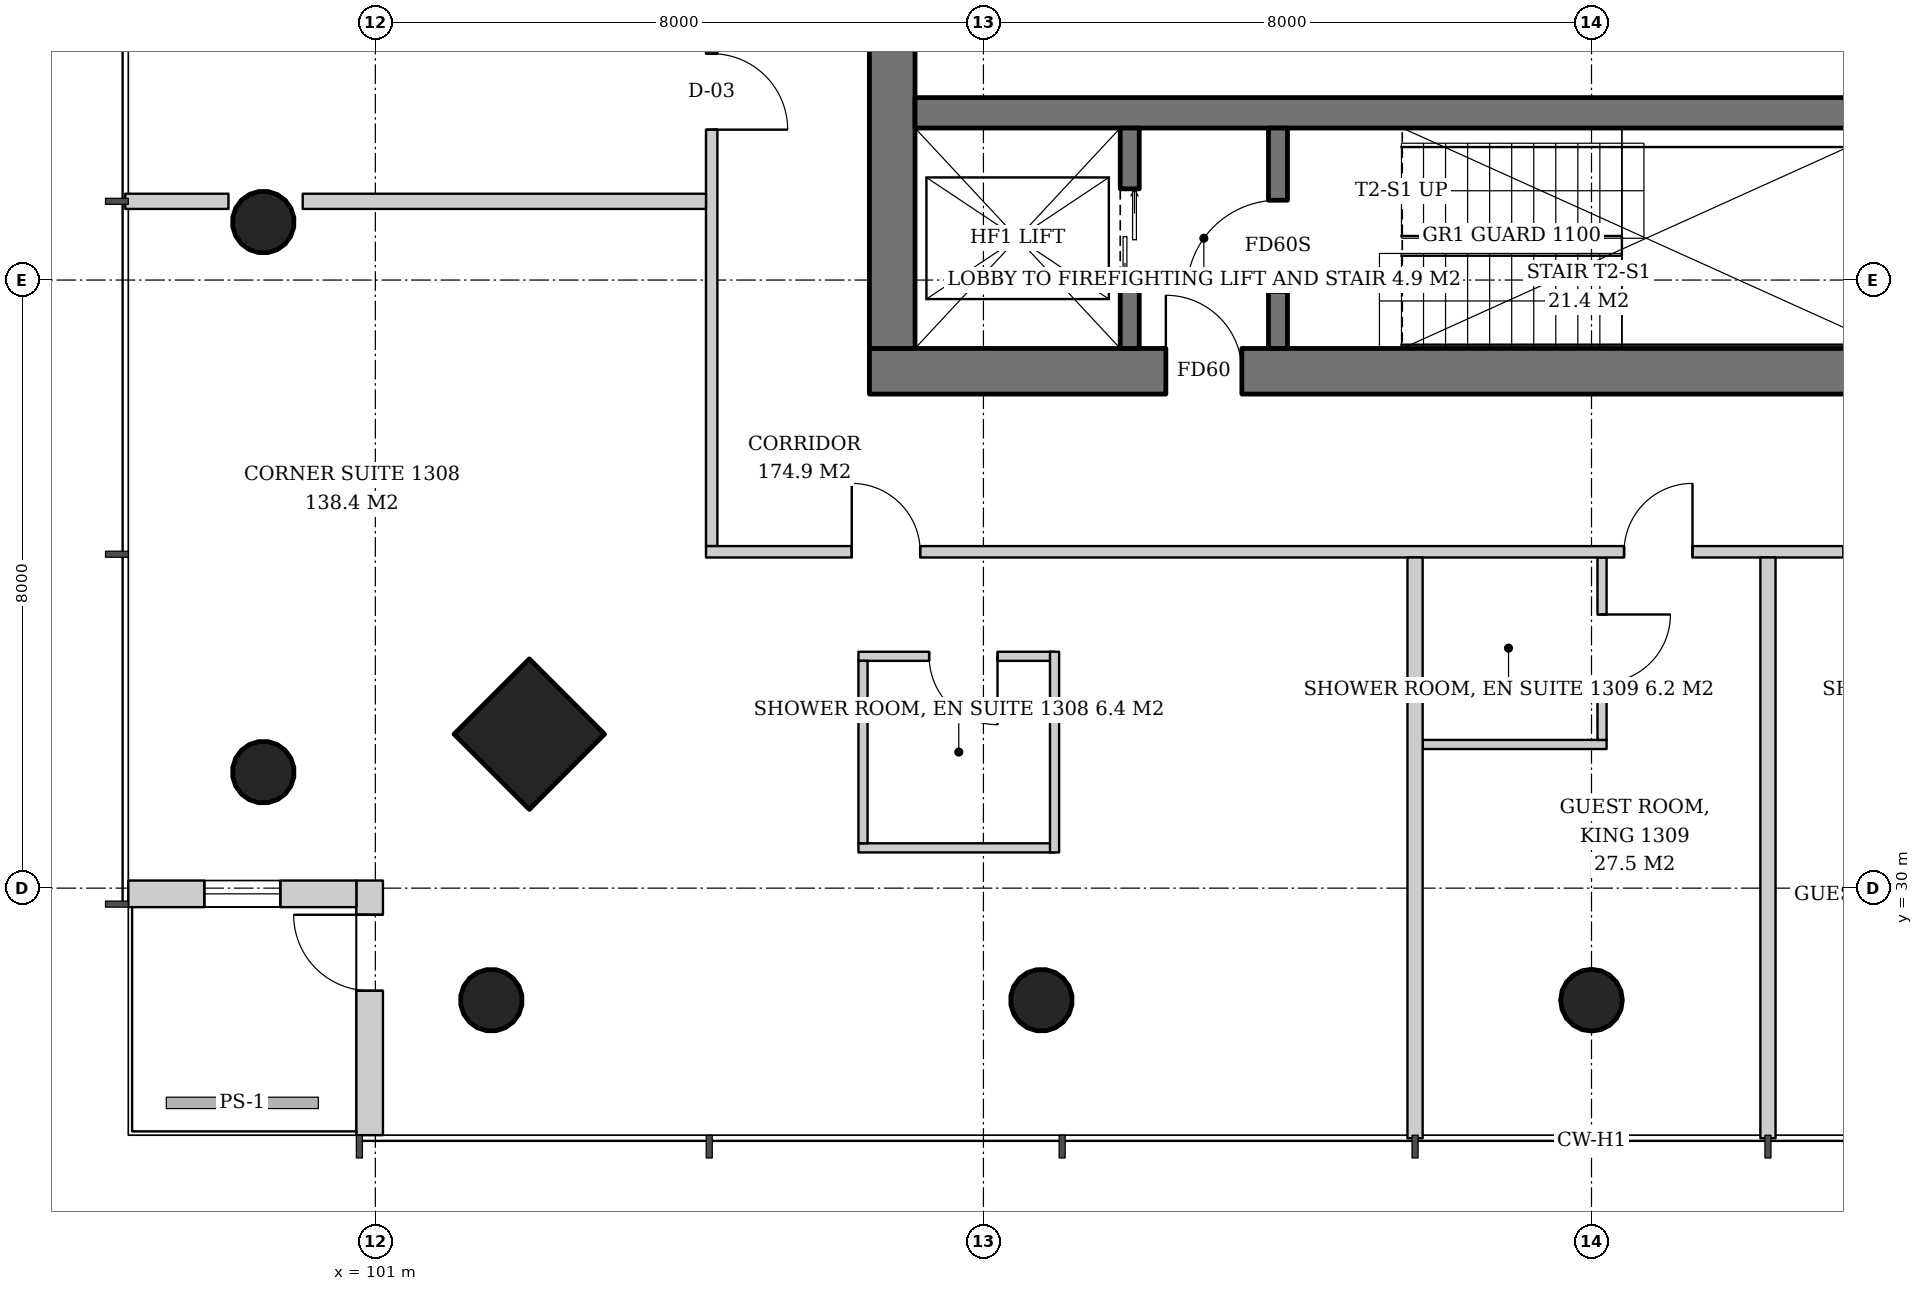
"""IFC4 building model, lengths in metres.
Left out: names, types, materials, properties, quantities, classifications, styles, units other than length and angle.
Written with IfcOpenShell. Run it as: python <this file> out.ifc"""

import sys

from ifc_helpers import new_model, si_unit, direction, frame, frame_2d, origin, origin_2d, place, context, subcontext, project, spatial, rectangle, hollow_circle, extrude, element, fill, save


model = new_model("IFC4")
c1 = context("Model", 3, precision=1e-05, world=origin(), true_north=direction((0.0, 1.0)))
c2 = subcontext(c1, "Body", "Model", "MODEL_VIEW")
j1 = project(units=[si_unit("LENGTHUNIT", "METRE"), si_unit("PLANEANGLEUNIT", "RADIAN")], contexts=[c1])
p1 = place(None, origin())
s1 = spatial("IfcSite", under=j1, at=p1, CompositionType="ELEMENT")
p2 = place(p1, origin())
s2 = spatial("IfcBuilding", under=s1, at=p2, CompositionType="ELEMENT")
p3 = place(p2, frame((0.0, 0.0, 55.2)))
s3 = spatial("IfcBuildingStorey", under=s2, at=p3, CompositionType="ELEMENT", Elevation=55.2)
p4 = place(p3, frame((102.974, 31.974, 0.0), z_axis=(0.043029647111, 0.043029647111, 0.998146732169), x_axis=(-0.707106781187, 0.707106781187, 0.0)))
e1 = element("IfcColumn", 1, at=p4, inside=s3, PredefinedType="COLUMN", context=c2, shape_type="SweptSolid", body=[
    extrude(rectangle(XDim=1.4, YDim=1.4, at=origin_2d()), origin(), (0.0, 0.0, 1.0), 3.807),
])
p5 = place(p3, frame((99.474, 31.474, 0.0), z_axis=(0.043029647111, 0.043029647111, 0.998146732169), x_axis=(-0.707106781187, 0.707106781187, 0.0)))
e2 = element("IfcColumn", 2, at=p5, inside=s3, PredefinedType="COLUMN", context=c2, shape_type="SweptSolid", body=[
    extrude(hollow_circle(Radius=0.406, WallThickness=0.03, at=origin_2d()), origin(), (0.0, 0.0, 1.0), 3.807),
])
p6 = place(p3, frame((99.474, 38.737, 0.0), z_axis=(0.043059584825, 0.021497706284, 0.998841188968), x_axis=(-0.446680166538, 0.894693706707, 0.0)))
e3 = element("IfcColumn", 3, at=p6, inside=s3, PredefinedType="COLUMN", context=c2, shape_type="SweptSolid", body=[
    extrude(hollow_circle(Radius=0.406, WallThickness=0.03, at=origin_2d()), origin(), (0.0, 0.0, 1.0), 3.804),
])
p7 = place(p3, frame((102.474, 28.474, 0.0), z_axis=(0.043029647111, 0.043029647111, 0.998146732169), x_axis=(-0.707106781187, 0.707106781187, 0.0)))
e4 = element("IfcColumn", 4, at=p7, inside=s3, PredefinedType="COLUMN", context=c2, shape_type="SweptSolid", body=[
    extrude(hollow_circle(Radius=0.406, WallThickness=0.03, at=origin_2d()), origin(), (0.0, 0.0, 1.0), 3.807),
])
p8 = place(p3, frame((109.737, 28.474, 0.0), z_axis=(0.021497706284, 0.043059584825, 0.998841188968), x_axis=(-0.894693706707, 0.446680166538, 0.0)))
e5 = element("IfcColumn", 5, at=p8, inside=s3, PredefinedType="COLUMN", context=c2, shape_type="SweptSolid", body=[
    extrude(hollow_circle(Radius=0.406, WallThickness=0.03, at=origin_2d()), origin(), (0.0, 0.0, 1.0), 3.804),
])
p9 = place(p3, frame((117.0, 28.474, 0.0), z_axis=(0.0, 0.043069538298, 0.999072076915), x_axis=(-1.0, 0.0, 0.0)))
e6 = element("IfcColumn", 6, at=p9, inside=s3, PredefinedType="COLUMN", context=c2, shape_type="SweptSolid", body=[
    extrude(hollow_circle(Radius=0.406, WallThickness=0.03, at=origin_2d()), origin(), (0.0, 0.0, 1.0), 3.803),
])
p10 = place(p3, frame((107.5, 36.8, 0.0), z_axis=(0.0, 0.0, 1.0), x_axis=(1.0, 0.0, 0.0)))
e7 = element("IfcWall", 7, at=p10, inside=s3, PredefinedType="SHEAR", context=c2, shape_type="SweptSolid", body=[
    extrude(rectangle(XDim=19.0, YDim=0.6, at=frame_2d((9.5, 0.0))), origin(), (0.0, 0.0, 1.0), 3.8),
])
p11 = place(p10, frame((3.9, 0.0, 0.0)))
e8 = element("IfcOpeningElement", 8, at=p11, cuts=e7, PredefinedType="OPENING", context=c2, shape_type="SweptSolid", body=[
    extrude(rectangle(XDim=1.0, YDim=2.1, at=frame_2d((0.5, 1.05))), frame((0.0, 0.31, 0.0), z_axis=(0.0, -1.0, 0.0), x_axis=(1.0, 0.0, 0.0)), (0.0, 0.0, 1.0), 0.62),
])
p12 = place(p10, frame((14.08, 0.0, 0.0)))
e9 = element("IfcOpeningElement", 9, at=p12, cuts=e7, PredefinedType="OPENING", context=c2, shape_type="SweptSolid", body=[
    extrude(rectangle(XDim=1.0, YDim=2.1, at=frame_2d((0.5, 1.05))), frame((0.0, 0.31, 0.0), z_axis=(0.0, -1.0, 0.0), x_axis=(1.0, 0.0, 0.0)), (0.0, 0.0, 1.0), 0.62),
])
p13 = place(p10, frame((15.542, 0.0, 0.0)))
e10 = element("IfcOpeningElement", 10, at=p13, cuts=e7, PredefinedType="OPENING", context=c2, shape_type="SweptSolid", body=[
    extrude(rectangle(XDim=1.0, YDim=2.1, at=frame_2d((0.5, 1.05))), frame((0.0, 0.31, 0.0), z_axis=(0.0, -1.0, 0.0), x_axis=(1.0, 0.0, 0.0)), (0.0, 0.0, 1.0), 0.62),
])
p14 = place(p10, frame((17.005, 0.0, 0.0)))
e11 = element("IfcOpeningElement", 11, at=p14, cuts=e7, PredefinedType="OPENING", context=c2, shape_type="SweptSolid", body=[
    extrude(rectangle(XDim=1.0, YDim=2.1, at=frame_2d((0.5, 1.05))), frame((0.0, 0.31, 0.0), z_axis=(0.0, -1.0, 0.0), x_axis=(1.0, 0.0, 0.0)), (0.0, 0.0, 1.0), 0.62),
])
p15 = place(p3, frame((107.8, 37.1, 0.0), z_axis=(0.0, 0.0, 1.0), x_axis=(0.0, 1.0, 0.0)))
e12 = element("IfcWall", 12, at=p15, inside=s3, PredefinedType="SHEAR", context=c2, shape_type="SweptSolid", body=[
    extrude(rectangle(XDim=17.8, YDim=0.6, at=frame_2d((8.9, 0.0))), origin(), (0.0, 0.0, 1.0), 3.8),
])
p16 = place(p15, frame((8.0, 0.0, 0.0)))
e13 = element("IfcOpeningElement", 13, at=p16, cuts=e12, PredefinedType="OPENING", context=c2, shape_type="SweptSolid", body=[
    extrude(rectangle(XDim=1.8, YDim=2.4, at=frame_2d((0.9, 1.2))), frame((0.0, 0.31, 0.0), z_axis=(0.0, -1.0, 0.0), x_axis=(1.0, 0.0, 0.0)), (0.0, 0.0, 1.0), 0.62),
])
p17 = place(p3, frame((108.1, 40.2, 0.0), z_axis=(0.0, 0.0, 1.0), x_axis=(1.0, 0.0, 0.0)))
e14 = element("IfcWall", 14, at=p17, inside=s3, PredefinedType="SHEAR", context=c2, shape_type="SweptSolid", body=[
    extrude(rectangle(XDim=17.8, YDim=0.4, at=frame_2d((8.9, 0.0))), origin(), (0.0, 0.0, 1.0), 3.8),
])
p18 = place(p3, frame((100.925, 26.75, 0.0), z_axis=(0.0, 0.0, 1.0), x_axis=(0.0, 1.0, 0.0)))
e15 = element("IfcWall", 15, at=p18, inside=s3, PredefinedType="SOLIDWALL", context=c2, shape_type="SweptSolid", body=[
    extrude(rectangle(XDim=3.35, YDim=0.35, at=frame_2d((1.675, 0.0))), origin(), (0.0, 0.0, 1.0), 3.6),
])
p19 = place(p18, frame((1.9, 0.0, 0.0)))
e16 = element("IfcOpeningElement", 16, at=p19, cuts=e15, PredefinedType="OPENING", context=c2, shape_type="SweptSolid", body=[
    extrude(rectangle(XDim=1.0, YDim=2.4, at=frame_2d((0.5, 1.2))), frame((0.0, 0.185, 0.0), z_axis=(0.0, -1.0, 0.0), x_axis=(1.0, 0.0, 0.0)), (0.0, 0.0, 1.0), 0.37),
])
p20 = place(p3, frame((100.75, 29.925, 0.0), z_axis=(0.0, 0.0, 1.0), x_axis=(-1.0, 0.0, 0.0)))
e17 = element("IfcWall", 17, at=p20, inside=s3, PredefinedType="SOLIDWALL", context=c2, shape_type="SweptSolid", body=[
    extrude(rectangle(XDim=3.0, YDim=0.35, at=frame_2d((1.5, 0.0))), origin(), (0.0, 0.0, 1.0), 3.6),
])
p21 = place(p20, frame((1.0, 0.0, 0.9)))
e18 = element("IfcOpeningElement", 18, at=p21, cuts=e17, PredefinedType="OPENING", context=c2, shape_type="SweptSolid", body=[
    extrude(rectangle(XDim=1.0, YDim=2.4, at=frame_2d((0.5, 1.2))), frame((0.0, 0.185, 0.0), z_axis=(0.0, -1.0, 0.0), x_axis=(1.0, 0.0, 0.0)), (0.0, 0.0, 1.0), 0.37),
])
p22 = place(p3, frame((110.925, 37.1, 0.0), z_axis=(0.0, 0.0, 1.0), x_axis=(0.0, 1.0, 0.0)))
e19 = element("IfcWall", 19, at=p22, inside=s3, PredefinedType="SHEAR", context=c2, shape_type="SweptSolid", body=[
    extrude(rectangle(XDim=2.9, YDim=0.25, at=frame_2d((1.45, 0.0))), origin(), (0.0, 0.0, 1.0), 3.8),
])
p23 = place(p22, frame((0.8, 0.0, 0.0)))
e20 = element("IfcOpeningElement", 20, at=p23, cuts=e19, PredefinedType="OPENING", context=c2, shape_type="SweptSolid", body=[
    extrude(rectangle(XDim=1.3, YDim=2.2, at=frame_2d((0.65, 1.1))), frame((0.0, 0.135, 0.0), z_axis=(0.0, -1.0, 0.0), x_axis=(1.0, 0.0, 0.0)), (0.0, 0.0, 1.0), 0.27),
])
p24 = place(p3, frame((112.875, 37.1, 0.0), z_axis=(0.0, 0.0, 1.0), x_axis=(0.0, 1.0, 0.0)))
e21 = element("IfcWall", 21, at=p24, inside=s3, PredefinedType="SHEAR", context=c2, shape_type="SweptSolid", body=[
    extrude(rectangle(XDim=2.9, YDim=0.25, at=frame_2d((1.45, 0.0))), origin(), (0.0, 0.0, 1.0), 3.8),
])
p25 = place(p24, frame((0.75, 0.0, 0.0)))
e22 = element("IfcOpeningElement", 22, at=p25, cuts=e21, PredefinedType="OPENING", context=c2, shape_type="SweptSolid", body=[
    extrude(rectangle(XDim=1.2, YDim=2.1, at=frame_2d((0.6, 1.05))), frame((0.0, 0.135, 0.0), z_axis=(0.0, -1.0, 0.0), x_axis=(1.0, 0.0, 0.0)), (0.0, 0.0, 1.0), 0.27),
])
p26 = place(p3, frame((105.425, 57.65, 0.0), z_axis=(0.0, 0.0, 1.0), x_axis=(0.0, -1.0, 0.0)))
e23 = element("IfcWall", 23, at=p26, inside=s3, PredefinedType="PARTITIONING", context=c2, shape_type="SweptSolid", body=[
    extrude(rectangle(XDim=23.15, YDim=0.15, at=frame_2d((11.575, 0.0))), origin(), (0.0, 0.0, 1.0), 2.8),
])
p27 = place(p26, frame((1.918, 0.0, 0.0)))
e24 = element("IfcOpeningElement", 24, at=p27, cuts=e23, PredefinedType="OPENING", context=c2, shape_type="SweptSolid", body=[
    extrude(rectangle(XDim=0.9, YDim=2.1, at=frame_2d((0.45, 1.05))), frame((0.0, 0.085, 0.0), z_axis=(0.0, -1.0, 0.0), x_axis=(1.0, 0.0, 0.0)), (0.0, 0.0, 1.0), 0.17),
])
p28 = place(p26, frame((7.436, 0.0, 0.0)))
e25 = element("IfcOpeningElement", 25, at=p28, cuts=e23, PredefinedType="OPENING", context=c2, shape_type="SweptSolid", body=[
    extrude(rectangle(XDim=0.9, YDim=2.1, at=frame_2d((0.45, 1.05))), frame((0.0, 0.085, 0.0), z_axis=(0.0, -1.0, 0.0), x_axis=(1.0, 0.0, 0.0)), (0.0, 0.0, 1.0), 0.17),
])
p29 = place(p26, frame((16.671, 0.0, 0.0)))
e26 = element("IfcOpeningElement", 26, at=p29, cuts=e23, PredefinedType="OPENING", context=c2, shape_type="SweptSolid", body=[
    extrude(rectangle(XDim=1.0, YDim=2.1, at=frame_2d((0.5, 1.05))), frame((0.0, 0.085, 0.0), z_axis=(0.0, -1.0, 0.0), x_axis=(1.0, 0.0, 0.0)), (0.0, 0.0, 1.0), 0.17),
])
p30 = place(p3, frame((105.35, 39.036, 0.0), z_axis=(0.0, 0.0, 1.0), x_axis=(-1.0, 0.0, 0.0)))
e27 = element("IfcWall", 27, at=p30, inside=s3, PredefinedType="PARTITIONING", context=c2, shape_type="SweptSolid", body=[
    extrude(rectangle(XDim=5.306, YDim=0.2, at=frame_2d((2.653, 0.0))), origin(), (0.0, 0.0, 1.0), 3.6),
])
p31 = place(p3, frame((99.068, 39.036, 0.0), z_axis=(0.0, 0.0, 1.0), x_axis=(-1.0, 0.0, 0.0)))
e28 = element("IfcWall", 28, at=p31, inside=s3, PredefinedType="PARTITIONING", context=c2, shape_type="SweptSolid", body=[
    extrude(rectangle(XDim=1.358, YDim=0.2, at=frame_2d((0.679, 0.0))), origin(), (0.0, 0.0, 1.0), 3.6),
])
p32 = place(p3, frame((109.936, 33.05, 0.0), z_axis=(0.0, 0.0, 1.0), x_axis=(-1.0, 0.0, 0.0)))
e29 = element("IfcWall", 29, at=p32, inside=s3, PredefinedType="PARTITIONING", context=c2, shape_type="SweptSolid", body=[
    extrude(rectangle(XDim=2.58, YDim=0.12, at=frame_2d((1.29, 0.0))), origin(), (0.0, 0.0, 1.0), 2.8),
])
p33 = place(p32, frame((0.75, 0.0, 0.0)))
e30 = element("IfcOpeningElement", 30, at=p33, cuts=e29, PredefinedType="OPENING", context=c2, shape_type="SweptSolid", body=[
    extrude(rectangle(XDim=0.9, YDim=2.1, at=frame_2d((0.45, 1.05))), frame((0.0, 0.07, 0.0), z_axis=(0.0, -1.0, 0.0), x_axis=(1.0, 0.0, 0.0)), (0.0, 0.0, 1.0), 0.14),
])
p34 = place(p3, frame((109.936, 30.53, 0.0), z_axis=(0.0, 0.0, 1.0), x_axis=(-1.0, 0.0, 0.0)))
e31 = element("IfcWall", 31, at=p34, inside=s3, PredefinedType="PARTITIONING", context=c2, shape_type="SweptSolid", body=[
    extrude(rectangle(XDim=2.58, YDim=0.12, at=frame_2d((1.29, 0.0))), origin(), (0.0, 0.0, 1.0), 2.8),
])
p35 = place(p3, frame((107.416, 32.99, 0.0), z_axis=(0.0, 0.0, 1.0), x_axis=(0.0, -1.0, 0.0)))
e32 = element("IfcWall", 32, at=p35, inside=s3, PredefinedType="PARTITIONING", context=c2, shape_type="SweptSolid", body=[
    extrude(rectangle(XDim=2.4, YDim=0.12, at=frame_2d((1.2, 0.0))), origin(), (0.0, 0.0, 1.0), 2.847),
])
p36 = place(p3, frame((109.936, 33.11, 0.0), z_axis=(0.0, 0.0, 1.0), x_axis=(0.0, -1.0, 0.0)))
e33 = element("IfcWall", 33, at=p36, inside=s3, PredefinedType="PARTITIONING", context=c2, shape_type="SweptSolid", body=[
    extrude(rectangle(XDim=2.64, YDim=0.12, at=frame_2d((1.32, 0.0))), origin(), (0.0, 0.0, 1.0), 3.6),
])
p37 = place(p3, frame((114.779, 31.89, 0.0), z_axis=(0.0, 0.0, 1.0), x_axis=(1.0, 0.0, 0.0)))
e34 = element("IfcWall", 34, at=p37, inside=s3, PredefinedType="PARTITIONING", context=c2, shape_type="SweptSolid", body=[
    extrude(rectangle(XDim=2.42, YDim=0.12, at=frame_2d((1.21, 0.0))), origin(), (0.0, 0.0, 1.0), 2.847),
])
p38 = place(p3, frame((117.139, 34.35, 0.0), z_axis=(0.0, 0.0, 1.0), x_axis=(0.0, -1.0, 0.0)))
e35 = element("IfcWall", 35, at=p38, inside=s3, PredefinedType="PARTITIONING", context=c2, shape_type="SweptSolid", body=[
    extrude(rectangle(XDim=2.4, YDim=0.12, at=frame_2d((1.2, 0.0))), origin(), (0.0, 0.0, 1.0), 3.6),
])
p39 = place(p38, frame((0.75, 0.0, 0.0)))
e36 = element("IfcOpeningElement", 36, at=p39, cuts=e35, PredefinedType="OPENING", context=c2, shape_type="SweptSolid", body=[
    extrude(rectangle(XDim=0.9, YDim=2.1, at=frame_2d((0.45, 1.05))), frame((0.0, 0.07, 0.0), z_axis=(0.0, -1.0, 0.0), x_axis=(1.0, 0.0, 0.0)), (0.0, 0.0, 1.0), 0.14),
])
p40 = place(p3, frame((105.35, 34.425, 0.0), z_axis=(0.0, 0.0, 1.0), x_axis=(1.0, 0.0, 0.0)))
e37 = element("IfcWall", 37, at=p40, inside=s3, PredefinedType="PARTITIONING", context=c2, shape_type="SweptSolid", body=[
    extrude(rectangle(XDim=23.15, YDim=0.15, at=frame_2d((11.575, 0.0))), origin(), (0.0, 0.0, 1.0), 2.8),
])
p41 = place(p40, frame((1.918, 0.0, 0.0)))
e38 = element("IfcOpeningElement", 38, at=p41, cuts=e37, PredefinedType="OPENING", context=c2, shape_type="SweptSolid", body=[
    extrude(rectangle(XDim=0.9, YDim=2.1, at=frame_2d((0.45, 1.05))), frame((0.0, 0.085, 0.0), z_axis=(0.0, -1.0, 0.0), x_axis=(1.0, 0.0, 0.0)), (0.0, 0.0, 1.0), 0.17),
])
p42 = place(p40, frame((12.079, 0.0, 0.0)))
e39 = element("IfcOpeningElement", 39, at=p42, cuts=e37, PredefinedType="OPENING", context=c2, shape_type="SweptSolid", body=[
    extrude(rectangle(XDim=0.9, YDim=2.1, at=frame_2d((0.45, 1.05))), frame((0.0, 0.085, 0.0), z_axis=(0.0, -1.0, 0.0), x_axis=(1.0, 0.0, 0.0)), (0.0, 0.0, 1.0), 0.17),
])
p43 = place(p40, frame((14.964, 0.0, 0.0)))
e40 = element("IfcOpeningElement", 40, at=p43, cuts=e37, PredefinedType="OPENING", context=c2, shape_type="SweptSolid", body=[
    extrude(rectangle(XDim=0.9, YDim=2.1, at=frame_2d((0.45, 1.05))), frame((0.0, 0.085, 0.0), z_axis=(0.0, -1.0, 0.0), x_axis=(1.0, 0.0, 0.0)), (0.0, 0.0, 1.0), 0.17),
])
for number, where, z_axis, x_axis in (
    (41, (114.678, 34.35, 0.0), (0.0, 0.0, 1.0), (0.0, -1.0, 0.0)),
    (42, (119.322, 34.35, 0.0), (0.0, 0.0, 1.0), (0.0, -1.0, 0.0)),
):
    element("IfcWall", number, at=place(p3, frame(where, z_axis=z_axis, x_axis=x_axis)), inside=s3, PredefinedType="PARTITIONING", context=c2, shape_type="SweptSolid", body=[
        extrude(rectangle(XDim=7.64, YDim=0.2, at=frame_2d((3.82, 0.0))), origin(), (0.0, 0.0, 1.0), 3.05),
    ])
p44 = place(p19, origin())
e43 = element("IfcDoor", 43, at=p44, inside=s3, OperationType="SINGLE_SWING_RIGHT", PredefinedType="DOOR", context=c2, shape_type="SweptSolid", body=[
    extrude(rectangle(XDim=1.0, YDim=2.4, at=frame_2d((0.5, 1.2))), frame((0.0, 0.025, 0.0), z_axis=(0.0, -1.0, 0.0), x_axis=(1.0, 0.0, 0.0)), (0.0, 0.0, 1.0), 0.05),
])
fill(e16, e43)
p45 = place(p21, origin())
e44 = element("IfcWindow", 44, at=p45, inside=s3, PartitioningType="SINGLE_PANEL", PredefinedType="WINDOW", context=c2, shape_type="SweptSolid", body=[
    extrude(rectangle(XDim=1.0, YDim=2.4, at=frame_2d((0.5, 1.2))), frame((0.0, 0.03, 0.0), z_axis=(0.0, -1.0, 0.0), x_axis=(1.0, 0.0, 0.0)), (0.0, 0.0, 1.0), 0.06),
])
fill(e18, e44)
p46 = place(p23, origin())
e45 = element("IfcDoor", 45, at=p46, inside=s3, OperationType="DOUBLE_DOOR_SLIDING", PredefinedType="DOOR", context=c2, shape_type="SweptSolid", body=[
    extrude(rectangle(XDim=1.3, YDim=2.2, at=frame_2d((0.65, 1.1))), frame((0.0, 0.025, 0.0), z_axis=(0.0, -1.0, 0.0), x_axis=(1.0, 0.0, 0.0)), (0.0, 0.0, 1.0), 0.05),
])
fill(e20, e45)
p47 = place(p25, origin())
e46 = element("IfcDoor", 46, at=p47, inside=s3, OperationType="SINGLE_SWING_LEFT", PredefinedType="DOOR", context=c2, shape_type="SweptSolid", body=[
    extrude(rectangle(XDim=1.2, YDim=2.1, at=frame_2d((0.6, 1.05))), frame((0.0, 0.025, 0.0), z_axis=(0.0, -1.0, 0.0), x_axis=(1.0, 0.0, 0.0)), (0.0, 0.0, 1.0), 0.05),
])
fill(e22, e46)
p48 = place(p11, origin())
e47 = element("IfcDoor", 47, at=p48, inside=s3, OperationType="SINGLE_SWING_LEFT", PredefinedType="DOOR", context=c2, shape_type="SweptSolid", body=[
    extrude(rectangle(XDim=1.0, YDim=2.1, at=frame_2d((0.5, 1.05))), frame((0.0, 0.025, 0.0), z_axis=(0.0, -1.0, 0.0), x_axis=(1.0, 0.0, 0.0)), (0.0, 0.0, 1.0), 0.05),
])
fill(e8, e47)
p49 = place(p29, origin())
e48 = element("IfcDoor", 48, at=p49, inside=s3, OperationType="SINGLE_SWING_RIGHT", PredefinedType="DOOR", context=c2, shape_type="SweptSolid", body=[
    extrude(rectangle(XDim=1.0, YDim=2.1, at=frame_2d((0.5, 1.05))), frame((0.0, 0.025, 0.0), z_axis=(0.0, -1.0, 0.0), x_axis=(1.0, 0.0, 0.0)), (0.0, 0.0, 1.0), 0.05),
])
fill(e26, e48)
p50 = place(p33, origin())
e49 = element("IfcDoor", 49, at=p50, inside=s3, OperationType="SINGLE_SWING_LEFT", PredefinedType="DOOR", context=c2, shape_type="SweptSolid", body=[
    extrude(rectangle(XDim=0.9, YDim=2.1, at=frame_2d((0.45, 1.05))), frame((0.0, 0.025, 0.0), z_axis=(0.0, -1.0, 0.0), x_axis=(1.0, 0.0, 0.0)), (0.0, 0.0, 1.0), 0.05),
])
fill(e30, e49)
p51 = place(p39, origin())
e50 = element("IfcDoor", 50, at=p51, inside=s3, OperationType="SINGLE_SWING_LEFT", PredefinedType="DOOR", context=c2, shape_type="SweptSolid", body=[
    extrude(rectangle(XDim=0.9, YDim=2.1, at=frame_2d((0.45, 1.05))), frame((0.0, 0.025, 0.0), z_axis=(0.0, -1.0, 0.0), x_axis=(1.0, 0.0, 0.0)), (0.0, 0.0, 1.0), 0.05),
])
fill(e36, e50)
p52 = place(p41, origin())
e51 = element("IfcDoor", 51, at=p52, inside=s3, OperationType="SINGLE_SWING_LEFT", PredefinedType="DOOR", context=c2, shape_type="SweptSolid", body=[
    extrude(rectangle(XDim=0.9, YDim=2.1, at=frame_2d((0.45, 1.05))), frame((0.0, 0.025, 0.0), z_axis=(0.0, -1.0, 0.0), x_axis=(1.0, 0.0, 0.0)), (0.0, 0.0, 1.0), 0.05),
])
fill(e38, e51)
p53 = place(p42, origin())
e52 = element("IfcDoor", 52, at=p53, inside=s3, OperationType="SINGLE_SWING_RIGHT", PredefinedType="DOOR", context=c2, shape_type="SweptSolid", body=[
    extrude(rectangle(XDim=0.9, YDim=2.1, at=frame_2d((0.45, 1.05))), frame((0.0, 0.025, 0.0), z_axis=(0.0, -1.0, 0.0), x_axis=(1.0, 0.0, 0.0)), (0.0, 0.0, 1.0), 0.05),
])
fill(e39, e52)
p54 = place(p43, origin())
e53 = element("IfcDoor", 53, at=p54, inside=s3, OperationType="SINGLE_SWING_RIGHT", PredefinedType="DOOR", context=c2, shape_type="SweptSolid", body=[
    extrude(rectangle(XDim=0.9, YDim=2.1, at=frame_2d((0.45, 1.05))), frame((0.0, 0.025, 0.0), z_axis=(0.0, -1.0, 0.0), x_axis=(1.0, 0.0, 0.0)), (0.0, 0.0, 1.0), 0.05),
])
fill(e40, e53)
save(model, sys.argv[1])
